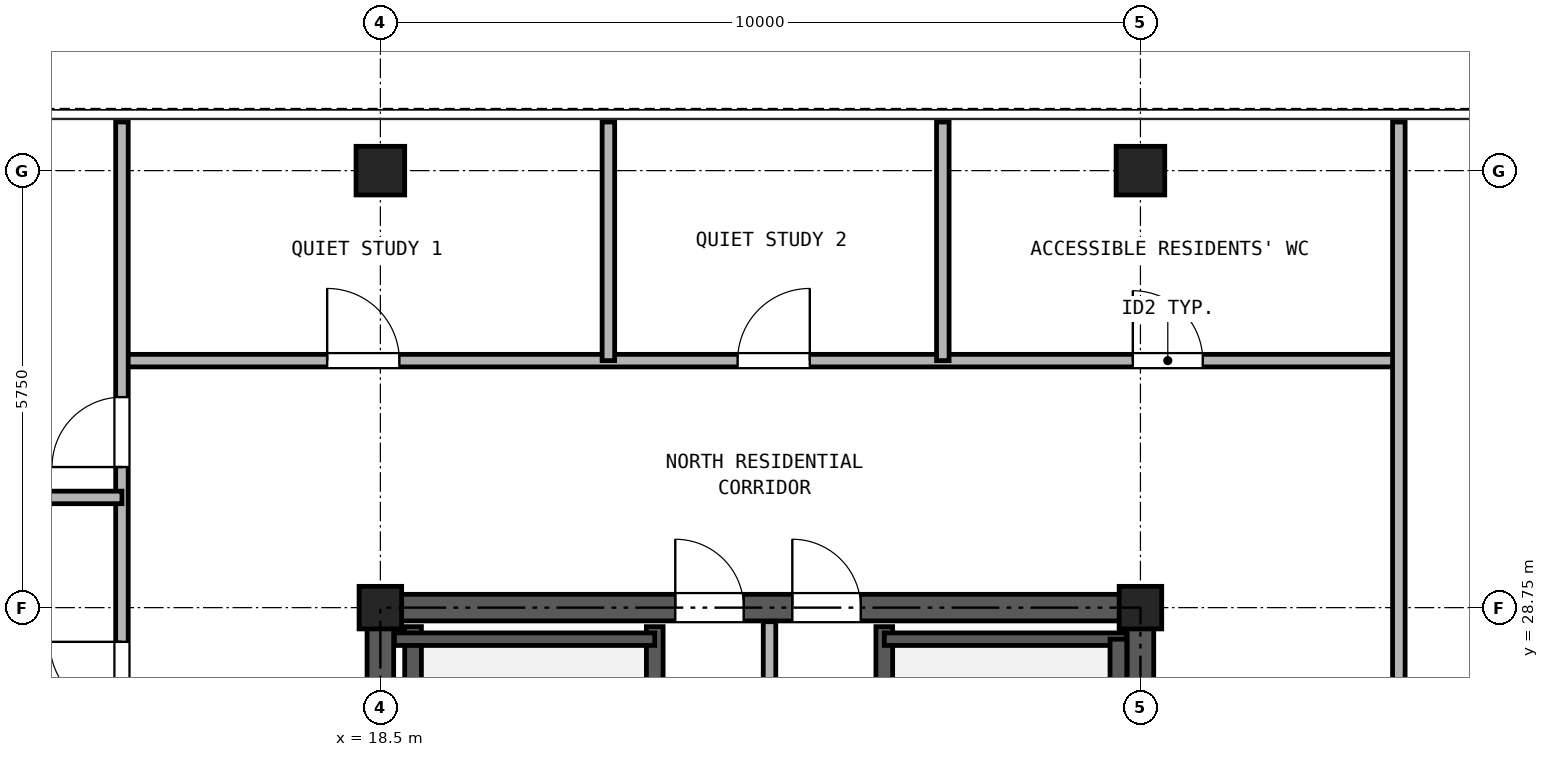
"""IFC4 building model, lengths in metres.
Left out: names, types, materials, properties, quantities, classifications, styles, units other than length and angle.
Written with IfcOpenShell. Run it as: python <this file> out.ifc"""

import sys

from ifc_helpers import new_model, si_unit, direction, frame, frame_2d, origin, origin_2d, place, context, subcontext, project, spatial, rectangle, hollow_rectangle, extrude, source, transform, mapped, element, fill, save


model = new_model("IFC4")
c1 = context("Model", 3, precision=1e-05, world=origin(), true_north=direction((0.0, 1.0)))
c2 = subcontext(c1, "Body", "Model", "MODEL_VIEW")
j1 = project(units=[si_unit("LENGTHUNIT", "METRE"), si_unit("PLANEANGLEUNIT", "RADIAN")], contexts=[c1])
p1 = place(None, origin())
s1 = spatial("IfcSite", under=j1, at=p1, CompositionType="ELEMENT")
p2 = place(p1, origin())
s2 = spatial("IfcBuilding", under=s1, at=p2, CompositionType="ELEMENT")
p3 = place(p2, frame((0.0, 0.0, 255.3)))
s3 = spatial("IfcBuildingStorey", under=s2, at=p3, CompositionType="ELEMENT", Elevation=255.3)
m1 = source(origin(), c2, "Body", "SweptSolid", [
    extrude(hollow_rectangle(XDim=0.64, YDim=0.64, WallThickness=0.035, at=origin_2d()), origin(), (0.0, 0.0, 1.0), 2.98),
])
for number, where, z_axis, x_axis in (
    (1, (18.5, 34.5, 0.0), (0.0, 0.0, 1.0), (1.0, 0.0, 0.0)),
    (2, (28.5, 34.5, 0.0), (0.0, 0.0, 1.0), (1.0, 0.0, 0.0)),
):
    element("IfcColumn", number, at=place(p3, frame(where, z_axis=z_axis, x_axis=x_axis)), inside=s3, PredefinedType="COLUMN", context=c2, shape_type="MappedRepresentation", body=[
        mapped(m1, transform((0.0, 0.0, 0.0), x_axis=(1.0, 0.0, 0.0), y_axis=(0.0, 1.0, 0.0), z_axis=(0.0, 0.0, 1.0), scale=1.0)),
    ])
m2 = source(origin(), c2, "Body", "SweptSolid", [
    extrude(hollow_rectangle(XDim=0.56, YDim=0.56, WallThickness=0.03, at=origin_2d()), origin(), (0.0, 0.0, 1.0), 2.98),
])
for number, where, z_axis, x_axis in (
    (3, (18.5, 28.75, 0.0), (0.0, 0.0, 1.0), (1.0, 0.0, 0.0)),
    (4, (28.5, 28.75, 0.0), (0.0, 0.0, 1.0), (1.0, 0.0, 0.0)),
):
    element("IfcColumn", number, at=place(p3, frame(where, z_axis=z_axis, x_axis=x_axis)), inside=s3, PredefinedType="COLUMN", context=c2, shape_type="MappedRepresentation", body=[
        mapped(m2, transform((0.0, 0.0, 0.0), x_axis=(1.0, 0.0, 0.0), y_axis=(0.0, 1.0, 0.0), z_axis=(0.0, 0.0, 1.0), scale=1.0)),
    ])
p4 = place(p3, frame((18.325, 28.75, 0.0), z_axis=(0.0, 0.0, 1.0), x_axis=(1.0, 0.0, 0.0)))
e5 = element("IfcWall", 5, at=p4, inside=s3, PredefinedType="SHEAR", context=c2, shape_type="SweptSolid", body=[
    extrude(rectangle(XDim=10.35, YDim=0.35, at=frame_2d((5.175, 0.0))), origin(), (0.0, 0.0, 1.0), 2.98),
])
p5 = place(p4, frame((4.055, 0.0, 0.0)))
e6 = element("IfcOpeningElement", 6, at=p5, cuts=e5, PredefinedType="OPENING", context=c2, shape_type="SweptSolid", body=[
    extrude(rectangle(XDim=0.9, YDim=2.05, at=frame_2d((0.45, 1.025))), frame((0.0, 0.185, 0.0), z_axis=(0.0, -1.0, 0.0), x_axis=(1.0, 0.0, 0.0)), (0.0, 0.0, 1.0), 0.37),
])
p6 = place(p4, frame((5.595, 0.0, 0.0)))
e7 = element("IfcOpeningElement", 7, at=p6, cuts=e5, PredefinedType="OPENING", context=c2, shape_type="SweptSolid", body=[
    extrude(rectangle(XDim=0.9, YDim=2.05, at=frame_2d((0.45, 1.025))), frame((0.0, 0.185, 0.0), z_axis=(0.0, -1.0, 0.0), x_axis=(1.0, 0.0, 0.0)), (0.0, 0.0, 1.0), 0.37),
])
p7 = place(p3, frame((18.5, 11.675, 0.0), z_axis=(0.0, 0.0, 1.0), x_axis=(0.0, 1.0, 0.0)))
e8 = element("IfcWall", 8, at=p7, inside=s3, PredefinedType="SHEAR", context=c2, shape_type="SweptSolid", body=[
    extrude(rectangle(XDim=16.9, YDim=0.35, at=frame_2d((8.45, 0.0))), origin(), (0.0, 0.0, 1.0), 2.98),
])
p8 = place(p7, frame((7.475, 0.0, 0.0)))
e9 = element("IfcOpeningElement", 9, at=p8, cuts=e8, PredefinedType="OPENING", context=c2, shape_type="SweptSolid", body=[
    extrude(rectangle(XDim=1.15, YDim=2.2, at=frame_2d((0.575, 1.1))), frame((0.0, 0.185, 0.0), z_axis=(0.0, -1.0, 0.0), x_axis=(1.0, 0.0, 0.0)), (0.0, 0.0, 1.0), 0.37),
])
p9 = place(p3, frame((28.5, 11.675, 0.0), z_axis=(0.0, 0.0, 1.0), x_axis=(0.0, 1.0, 0.0)))
e10 = element("IfcWall", 10, at=p9, inside=s3, PredefinedType="SHEAR", context=c2, shape_type="SweptSolid", body=[
    extrude(rectangle(XDim=16.9, YDim=0.35, at=frame_2d((8.45, 0.0))), origin(), (0.0, 0.0, 1.0), 2.98),
])
p10 = place(p9, frame((7.475, 0.0, 0.0)))
e11 = element("IfcOpeningElement", 11, at=p10, cuts=e10, PredefinedType="OPENING", context=c2, shape_type="SweptSolid", body=[
    extrude(rectangle(XDim=1.15, YDim=2.2, at=frame_2d((0.575, 1.1))), frame((0.0, 0.185, 0.0), z_axis=(0.0, -1.0, 0.0), x_axis=(1.0, 0.0, 0.0)), (0.0, 0.0, 1.0), 0.37),
])
for number, where, z_axis, x_axis in (
    (12, (18.93, 21.39, 0.0), (0.0, 0.0, 1.0), (0.0, 1.0, 0.0)),
    (13, (22.11, 21.39, 0.0), (0.0, 0.0, 1.0), (0.0, 1.0, 0.0)),
    (14, (25.13, 21.39, 0.0), (0.0, 0.0, 1.0), (0.0, 1.0, 0.0)),
):
    element("IfcWall", number, at=place(p3, frame(where, z_axis=z_axis, x_axis=x_axis)), inside=s3, PredefinedType="SOLIDWALL", context=c2, shape_type="SweptSolid", body=[
        extrude(rectangle(XDim=7.11, YDim=0.22, at=frame_2d((3.555, 0.0))), origin(), (0.0, 0.0, 1.0), 2.98),
    ])
p11 = place(p3, frame((18.685, 28.335, 0.0), z_axis=(0.0, 0.0, 1.0), x_axis=(1.0, 0.0, 0.0)))
e15 = element("IfcWall", 15, at=p11, inside=s3, PredefinedType="PARTITIONING", context=c2, shape_type="SweptSolid", body=[
    extrude(rectangle(XDim=3.425, YDim=0.165, at=frame_2d((1.712, 0.0))), origin(), (0.0, 0.0, 1.0), 2.98),
])
p12 = place(p3, frame((25.13, 28.335, 0.0), z_axis=(0.0, 0.0, 1.0), x_axis=(1.0, 0.0, 0.0)))
e16 = element("IfcWall", 16, at=p12, inside=s3, PredefinedType="PARTITIONING", context=c2, shape_type="SweptSolid", body=[
    extrude(rectangle(XDim=3.185, YDim=0.165, at=frame_2d((1.593, 0.0))), origin(), (0.0, 0.0, 1.0), 2.98),
])
p13 = place(p3, frame((28.21, 21.39, 0.0), z_axis=(0.0, 0.0, 1.0), x_axis=(0.0, 1.0, 0.0)))
e17 = element("IfcWall", 17, at=p13, inside=s3, PredefinedType="SOLIDWALL", context=c2, shape_type="SweptSolid", body=[
    extrude(rectangle(XDim=6.945, YDim=0.22, at=frame_2d((3.473, 0.0))), origin(), (0.0, 0.0, 1.0), 2.98),
])
p14 = place(p3, frame((23.62, 24.4, 0.0), z_axis=(0.0, 0.0, 1.0), x_axis=(0.0, 1.0, 0.0)))
e18 = element("IfcWall", 18, at=p14, inside=s3, PredefinedType="PARTITIONING", context=c2, shape_type="SweptSolid", body=[
    extrude(rectangle(XDim=4.165, YDim=0.165, at=frame_2d((2.083, 0.0))), origin(), (0.0, 0.0, 1.0), 2.98),
])
p15 = place(p3, frame((15.1, 32.0, 0.0), z_axis=(0.0, 0.0, 1.0), x_axis=(1.0, 0.0, 0.0)))
e19 = element("IfcWall", 19, at=p15, inside=s3, PredefinedType="PARTITIONING", context=c2, shape_type="SweptSolid", body=[
    extrude(rectangle(XDim=16.8, YDim=0.165, at=frame_2d((8.4, 0.0))), origin(), (0.0, 0.0, 1.0), 2.98),
])
p16 = place(p15, frame((2.7, 0.0, 0.0)))
e20 = element("IfcOpeningElement", 20, at=p16, cuts=e19, PredefinedType="OPENING", context=c2, shape_type="SweptSolid", body=[
    extrude(rectangle(XDim=0.95, YDim=2.15, at=frame_2d((0.475, 1.075))), frame((0.0, 0.093, 0.0), z_axis=(0.0, -1.0, 0.0), x_axis=(1.0, 0.0, 0.0)), (0.0, 0.0, 1.0), 0.185),
])
p17 = place(p15, frame((8.1, 0.0, 0.0)))
e21 = element("IfcOpeningElement", 21, at=p17, cuts=e19, PredefinedType="OPENING", context=c2, shape_type="SweptSolid", body=[
    extrude(rectangle(XDim=0.95, YDim=2.15, at=frame_2d((0.475, 1.075))), frame((0.0, 0.093, 0.0), z_axis=(0.0, -1.0, 0.0), x_axis=(1.0, 0.0, 0.0)), (0.0, 0.0, 1.0), 0.185),
])
p18 = place(p15, frame((13.3, 0.0, 0.0)))
e22 = element("IfcOpeningElement", 22, at=p18, cuts=e19, PredefinedType="OPENING", context=c2, shape_type="SweptSolid", body=[
    extrude(rectangle(XDim=0.92, YDim=2.1, at=frame_2d((0.46, 1.05))), frame((0.0, 0.093, 0.0), z_axis=(0.0, -1.0, 0.0), x_axis=(1.0, 0.0, 0.0)), (0.0, 0.0, 1.0), 0.185),
])
p19 = place(p3, frame((15.1, 10.6, 0.0), z_axis=(0.0, 0.0, 1.0), x_axis=(0.0, 1.0, 0.0)))
e23 = element("IfcWall", 23, at=p19, inside=s3, PredefinedType="PARTITIONING", context=c2, shape_type="SweptSolid", body=[
    extrude(rectangle(XDim=24.54, YDim=0.165, at=frame_2d((12.27, 0.0))), origin(), (0.0, 0.0, 1.0), 2.98),
])
p20 = place(p19, frame((3.45, 0.0, 0.0)))
e24 = element("IfcOpeningElement", 24, at=p20, cuts=e23, PredefinedType="OPENING", context=c2, shape_type="SweptSolid", body=[
    extrude(rectangle(XDim=0.95, YDim=2.15, at=frame_2d((0.475, 1.075))), frame((0.0, 0.093, 0.0), z_axis=(0.0, -1.0, 0.0), x_axis=(1.0, 0.0, 0.0)), (0.0, 0.0, 1.0), 0.185),
])
p21 = place(p19, frame((10.9, 0.0, 0.0)))
e25 = element("IfcOpeningElement", 25, at=p21, cuts=e23, PredefinedType="OPENING", context=c2, shape_type="SweptSolid", body=[
    extrude(rectangle(XDim=0.95, YDim=2.15, at=frame_2d((0.475, 1.075))), frame((0.0, 0.093, 0.0), z_axis=(0.0, -1.0, 0.0), x_axis=(1.0, 0.0, 0.0)), (0.0, 0.0, 1.0), 0.185),
])
p22 = place(p19, frame((16.75, 0.0, 0.0)))
e26 = element("IfcOpeningElement", 26, at=p22, cuts=e23, PredefinedType="OPENING", context=c2, shape_type="SweptSolid", body=[
    extrude(rectangle(XDim=0.95, YDim=2.15, at=frame_2d((0.475, 1.075))), frame((0.0, 0.093, 0.0), z_axis=(0.0, -1.0, 0.0), x_axis=(1.0, 0.0, 0.0)), (0.0, 0.0, 1.0), 0.185),
])
p23 = place(p19, frame((20.0, 0.0, 0.0)))
e27 = element("IfcOpeningElement", 27, at=p23, cuts=e23, PredefinedType="OPENING", context=c2, shape_type="SweptSolid", body=[
    extrude(rectangle(XDim=0.92, YDim=2.1, at=frame_2d((0.46, 1.05))), frame((0.0, 0.093, 0.0), z_axis=(0.0, -1.0, 0.0), x_axis=(1.0, 0.0, 0.0)), (0.0, 0.0, 1.0), 0.185),
])
p24 = place(p3, frame((31.9, 10.6, 0.0), z_axis=(0.0, 0.0, 1.0), x_axis=(0.0, 1.0, 0.0)))
e28 = element("IfcWall", 28, at=p24, inside=s3, PredefinedType="PARTITIONING", context=c2, shape_type="SweptSolid", body=[
    extrude(rectangle(XDim=24.54, YDim=0.165, at=frame_2d((12.27, 0.0))), origin(), (0.0, 0.0, 1.0), 2.98),
])
p25 = place(p24, frame((4.95, 0.0, 0.0)))
e29 = element("IfcOpeningElement", 29, at=p25, cuts=e28, PredefinedType="OPENING", context=c2, shape_type="SweptSolid", body=[
    extrude(rectangle(XDim=1.0, YDim=2.15, at=frame_2d((0.5, 1.075))), frame((0.0, 0.093, 0.0), z_axis=(0.0, -1.0, 0.0), x_axis=(1.0, 0.0, 0.0)), (0.0, 0.0, 1.0), 0.185),
])
p26 = place(p24, frame((15.65, 0.0, 0.0)))
e30 = element("IfcOpeningElement", 30, at=p26, cuts=e28, PredefinedType="OPENING", context=c2, shape_type="SweptSolid", body=[
    extrude(rectangle(XDim=1.0, YDim=2.15, at=frame_2d((0.5, 1.075))), frame((0.0, 0.093, 0.0), z_axis=(0.0, -1.0, 0.0), x_axis=(1.0, 0.0, 0.0)), (0.0, 0.0, 1.0), 0.185),
])
p27 = place(p3, frame((5.36, 30.2, 0.0), z_axis=(0.0, 0.0, 1.0), x_axis=(1.0, 0.0, 0.0)))
e31 = element("IfcWall", 31, at=p27, inside=s3, PredefinedType="PARTITIONING", context=c2, shape_type="SweptSolid", body=[
    extrude(rectangle(XDim=9.74, YDim=0.165, at=frame_2d((4.87, 0.0))), origin(), (0.0, 0.0, 1.0), 2.98),
])
for number, where, z_axis, x_axis in (
    (32, (21.5, 32.0, 0.0), (0.0, 0.0, 1.0), (0.0, 1.0, 0.0)),
    (33, (25.9, 32.0, 0.0), (0.0, 0.0, 1.0), (0.0, 1.0, 0.0)),
):
    element("IfcWall", number, at=place(p3, frame(where, z_axis=z_axis, x_axis=x_axis)), inside=s3, PredefinedType="PARTITIONING", context=c2, shape_type="SweptSolid", body=[
        extrude(rectangle(XDim=3.14, YDim=0.165, at=frame_2d((1.57, 0.0))), origin(), (0.0, 0.0, 1.0), 2.98),
    ])
p28 = place(p5, origin())
e34 = element("IfcDoor", 34, at=p28, inside=s3, OperationType="SINGLE_SWING_LEFT", PredefinedType="DOOR", context=c2, shape_type="SweptSolid", body=[
    extrude(rectangle(XDim=0.9, YDim=2.05, at=frame_2d((0.45, 1.025))), frame((0.0, 0.025, 0.0), z_axis=(0.0, -1.0, 0.0), x_axis=(1.0, 0.0, 0.0)), (0.0, 0.0, 1.0), 0.05),
])
fill(e6, e34)
p29 = place(p6, origin())
e35 = element("IfcDoor", 35, at=p29, inside=s3, OperationType="SINGLE_SWING_LEFT", PredefinedType="DOOR", context=c2, shape_type="SweptSolid", body=[
    extrude(rectangle(XDim=0.9, YDim=2.05, at=frame_2d((0.45, 1.025))), frame((0.0, 0.025, 0.0), z_axis=(0.0, -1.0, 0.0), x_axis=(1.0, 0.0, 0.0)), (0.0, 0.0, 1.0), 0.05),
])
fill(e7, e35)
p30 = place(p22, frame((0.95, 0.0, 0.0), z_axis=(0.0, 0.0, 1.0), x_axis=(-1.0, 0.0, 0.0)))
e36 = element("IfcDoor", 36, at=p30, inside=s3, OperationType="SINGLE_SWING_RIGHT", PredefinedType="DOOR", context=c2, shape_type="SweptSolid", body=[
    extrude(rectangle(XDim=0.95, YDim=2.15, at=frame_2d((0.475, 1.075))), frame((0.0, 0.025, 0.0), z_axis=(0.0, -1.0, 0.0), x_axis=(1.0, 0.0, 0.0)), (0.0, 0.0, 1.0), 0.05),
])
fill(e26, e36)
p31 = place(p23, frame((0.92, 0.0, 0.0), z_axis=(0.0, 0.0, 1.0), x_axis=(-1.0, 0.0, 0.0)))
e37 = element("IfcDoor", 37, at=p31, inside=s3, OperationType="SINGLE_SWING_LEFT", PredefinedType="DOOR", context=c2, shape_type="SweptSolid", body=[
    extrude(rectangle(XDim=0.92, YDim=2.1, at=frame_2d((0.46, 1.05))), frame((0.0, 0.025, 0.0), z_axis=(0.0, -1.0, 0.0), x_axis=(1.0, 0.0, 0.0)), (0.0, 0.0, 1.0), 0.05),
])
fill(e27, e37)
p32 = place(p16, origin())
e38 = element("IfcDoor", 38, at=p32, inside=s3, OperationType="SINGLE_SWING_LEFT", PredefinedType="DOOR", context=c2, shape_type="SweptSolid", body=[
    extrude(rectangle(XDim=0.95, YDim=2.15, at=frame_2d((0.475, 1.075))), frame((0.0, 0.025, 0.0), z_axis=(0.0, -1.0, 0.0), x_axis=(1.0, 0.0, 0.0)), (0.0, 0.0, 1.0), 0.05),
])
fill(e20, e38)
p33 = place(p17, origin())
e39 = element("IfcDoor", 39, at=p33, inside=s3, OperationType="SINGLE_SWING_RIGHT", PredefinedType="DOOR", context=c2, shape_type="SweptSolid", body=[
    extrude(rectangle(XDim=0.95, YDim=2.15, at=frame_2d((0.475, 1.075))), frame((0.0, 0.025, 0.0), z_axis=(0.0, -1.0, 0.0), x_axis=(1.0, 0.0, 0.0)), (0.0, 0.0, 1.0), 0.05),
])
fill(e21, e39)
p34 = place(p18, origin())
e40 = element("IfcDoor", 40, at=p34, inside=s3, OperationType="SINGLE_SWING_LEFT", PredefinedType="DOOR", context=c2, shape_type="SweptSolid", body=[
    extrude(rectangle(XDim=0.92, YDim=2.1, at=frame_2d((0.46, 1.05))), frame((0.0, 0.025, 0.0), z_axis=(0.0, -1.0, 0.0), x_axis=(1.0, 0.0, 0.0)), (0.0, 0.0, 1.0), 0.05),
])
fill(e22, e40)
save(model, sys.argv[1])
